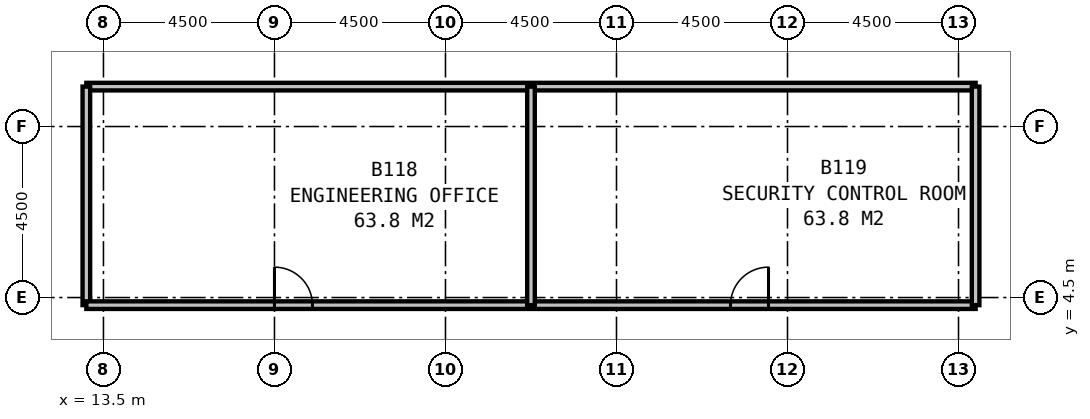
"""IFC4 building model, lengths in metres.
Left out: names, types, materials, properties, quantities, classifications, styles, units other than length and angle.
Written with IfcOpenShell. Run it as: python <this file> out.ifc"""

import sys

from ifc_helpers import new_model, si_unit, direction, frame, frame_2d, origin, place, context, subcontext, project, spatial, rectangle, extrude, element, fill, save


model = new_model("IFC4")
c1 = context("Model", 3, precision=1e-05, world=origin(), true_north=direction((0.0, 1.0)))
c2 = subcontext(c1, "Body", "Model", "MODEL_VIEW")
j1 = project(units=[si_unit("LENGTHUNIT", "METRE"), si_unit("PLANEANGLEUNIT", "RADIAN")], contexts=[c1])
p1 = place(None, origin())
s1 = spatial("IfcSite", under=j1, at=p1, CompositionType="ELEMENT")
p2 = place(p1, origin())
s2 = spatial("IfcBuilding", under=s1, at=p2, CompositionType="ELEMENT")
p3 = place(p2, frame((0.0, 0.0, -4.5)))
s3 = spatial("IfcBuildingStorey", under=s2, at=p3, CompositionType="ELEMENT", Elevation=-4.5)
p4 = place(p3, frame((13.05, 4.3, 0.0), z_axis=(0.0, 0.0, 1.0), x_axis=(1.0, 0.0, 0.0)))
e1 = element("IfcWall", 1, at=p4, inside=s3, PredefinedType="PARTITIONING", context=c2, shape_type="SweptSolid", body=[
    extrude(rectangle(XDim=23.4, YDim=0.2, at=frame_2d((11.7, 0.0))), origin(), (0.0, 0.0, 1.0), 4.2),
])
p5 = place(p4, frame((4.95, 0.0, 0.0)))
e2 = element("IfcOpeningElement", 2, at=p5, cuts=e1, PredefinedType="OPENING", context=c2, shape_type="SweptSolid", body=[
    extrude(rectangle(XDim=1.0, YDim=2.1, at=frame_2d((0.5, 1.05))), frame((0.0, 0.11, 0.0), z_axis=(0.0, -1.0, 0.0), x_axis=(1.0, 0.0, 0.0)), (0.0, 0.0, 1.0), 0.22),
])
p6 = place(p4, frame((16.95, 0.0, 0.0)))
e3 = element("IfcOpeningElement", 3, at=p6, cuts=e1, PredefinedType="OPENING", context=c2, shape_type="SweptSolid", body=[
    extrude(rectangle(XDim=1.0, YDim=2.1, at=frame_2d((0.5, 1.05))), frame((0.0, 0.11, 0.0), z_axis=(0.0, -1.0, 0.0), x_axis=(1.0, 0.0, 0.0)), (0.0, 0.0, 1.0), 0.22),
])
for number, where, z_axis, x_axis in (
    (4, (13.05, 4.3, 0.0), (0.0, 0.0, 1.0), (0.0, 1.0, 0.0)),
    (5, (36.45, 4.3, 0.0), (0.0, 0.0, 1.0), (0.0, 1.0, 0.0)),
):
    element("IfcWall", number, at=place(p3, frame(where, z_axis=z_axis, x_axis=x_axis)), inside=s3, PredefinedType="PARTITIONING", context=c2, shape_type="SweptSolid", body=[
        extrude(rectangle(XDim=5.75, YDim=0.2, at=frame_2d((2.875, 0.0))), origin(), (0.0, 0.0, 1.0), 3.2),
    ])
p7 = place(p3, frame((13.05, 10.05, 0.0), z_axis=(0.0, 0.0, 1.0), x_axis=(1.0, 0.0, 0.0)))
e6 = element("IfcWall", 6, at=p7, inside=s3, PredefinedType="PARTITIONING", context=c2, shape_type="SweptSolid", body=[
    extrude(rectangle(XDim=23.4, YDim=0.2, at=frame_2d((11.7, 0.0))), origin(), (0.0, 0.0, 1.0), 4.2),
])
p8 = place(p3, frame((24.75, 4.3, 0.0), z_axis=(0.0, 0.0, 1.0), x_axis=(0.0, 1.0, 0.0)))
e7 = element("IfcWall", 7, at=p8, inside=s3, PredefinedType="PARTITIONING", context=c2, shape_type="SweptSolid", body=[
    extrude(rectangle(XDim=5.75, YDim=0.2, at=frame_2d((2.875, 0.0))), origin(), (0.0, 0.0, 1.0), 4.2),
])
p9 = place(p5, origin())
e8 = element("IfcDoor", 8, at=p9, inside=s3, OperationType="SINGLE_SWING_LEFT", PredefinedType="DOOR", context=c2, shape_type="SweptSolid", body=[
    extrude(rectangle(XDim=1.0, YDim=2.1, at=frame_2d((0.5, 1.05))), frame((0.0, 0.025, 0.0), z_axis=(0.0, -1.0, 0.0), x_axis=(1.0, 0.0, 0.0)), (0.0, 0.0, 1.0), 0.05),
])
fill(e2, e8)
p10 = place(p6, origin())
e9 = element("IfcDoor", 9, at=p10, inside=s3, OperationType="SINGLE_SWING_RIGHT", PredefinedType="DOOR", context=c2, shape_type="SweptSolid", body=[
    extrude(rectangle(XDim=1.0, YDim=2.1, at=frame_2d((0.5, 1.05))), frame((0.0, 0.025, 0.0), z_axis=(0.0, -1.0, 0.0), x_axis=(1.0, 0.0, 0.0)), (0.0, 0.0, 1.0), 0.05),
])
fill(e3, e9)
save(model, sys.argv[1])
